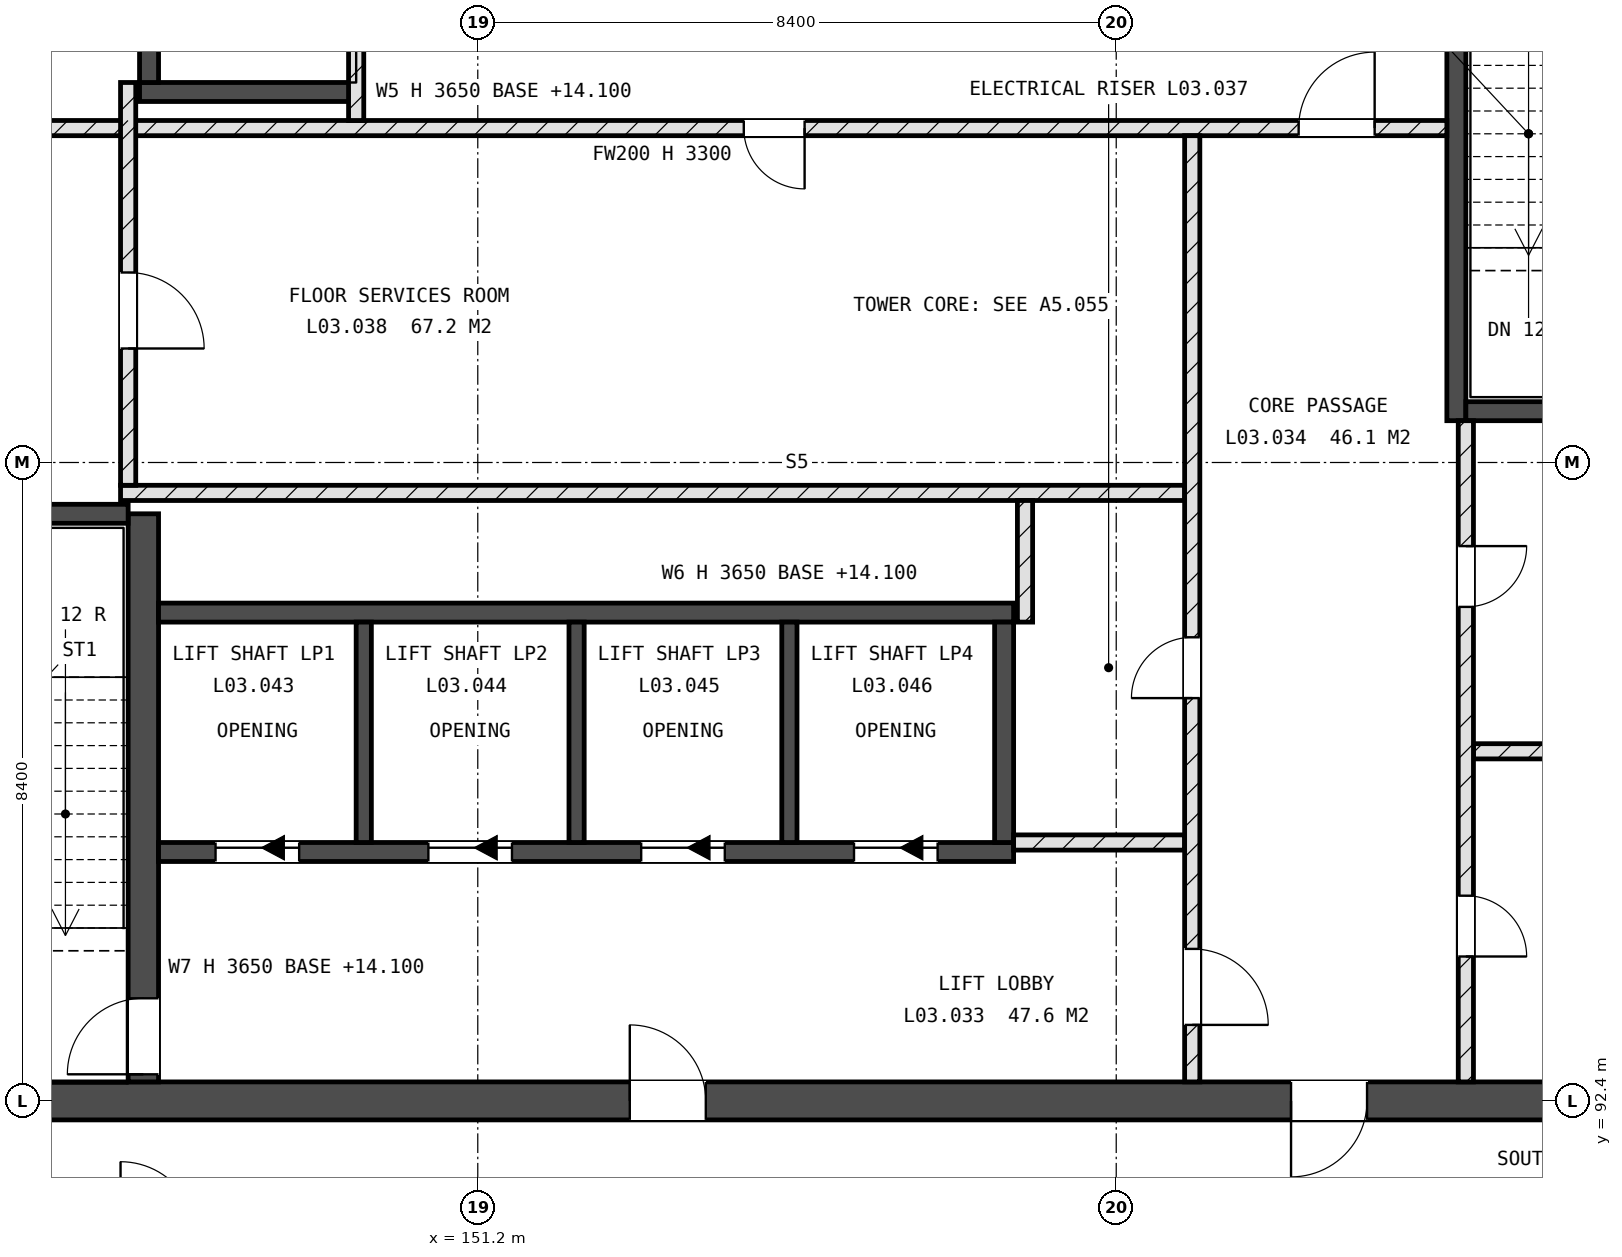
"""IFC4 building model, lengths in metres.
Left out: names, types, materials, properties, quantities, classifications, styles, units other than length and angle.
Written with IfcOpenShell. Run it as: python <this file> out.ifc"""

import sys

from ifc_helpers import new_model, si_unit, direction, frame, frame_2d, origin, place, context, subcontext, project, spatial, rectangle, extrude, element, fill, save


model = new_model("IFC4")
c1 = context("Model", 3, precision=1e-05, world=origin(), true_north=direction((0.0, 1.0)))
c2 = subcontext(c1, "Body", "Model", "MODEL_VIEW")
j1 = project(units=[si_unit("LENGTHUNIT", "METRE"), si_unit("PLANEANGLEUNIT", "RADIAN")], contexts=[c1])
p1 = place(None, origin())
s1 = spatial("IfcSite", under=j1, at=p1, CompositionType="ELEMENT")
p2 = place(p1, origin())
s2 = spatial("IfcBuilding", under=s1, at=p2, CompositionType="ELEMENT")
p3 = place(p2, frame((0.0, 0.0, 14.4)))
s3 = spatial("IfcBuildingStorey", under=s2, at=p3, CompositionType="ELEMENT", Elevation=14.4)
p4 = place(p3, frame((142.8, 92.4, -0.3), z_axis=(0.0, 0.0, 1.0), x_axis=(1.0, 0.0, 0.0)))
e1 = element("IfcWall", 1, at=p4, inside=s3, PredefinedType="SHEAR", context=c2, shape_type="SweptSolid", body=[
    extrude(rectangle(XDim=25.2, YDim=0.5, at=frame_2d((12.6, 0.0))), origin(), (0.0, 0.0, 1.0), 3.65),
])
p5 = place(p4, frame((1.4, 0.0, 0.3)))
e2 = element("IfcOpeningElement", 2, at=p5, cuts=e1, PredefinedType="OPENING", context=c2, shape_type="SweptSolid", body=[
    extrude(rectangle(XDim=1.0, YDim=2.1, at=frame_2d((0.5, 1.05))), frame((0.0, 0.26, 0.0), z_axis=(0.0, -1.0, 0.0), x_axis=(1.0, 0.0, 0.0)), (0.0, 0.0, 1.0), 0.52),
])
p6 = place(p4, frame((19.1, 0.0, 0.3)))
e3 = element("IfcOpeningElement", 3, at=p6, cuts=e1, PredefinedType="OPENING", context=c2, shape_type="SweptSolid", body=[
    extrude(rectangle(XDim=1.0, YDim=2.1, at=frame_2d((0.5, 1.05))), frame((0.0, 0.26, 0.0), z_axis=(0.0, -1.0, 0.0), x_axis=(1.0, 0.0, 0.0)), (0.0, 0.0, 1.0), 0.52),
])
p7 = place(p4, frame((10.4, 0.0, 0.3)))
e4 = element("IfcOpeningElement", 4, at=p7, cuts=e1, PredefinedType="OPENING", context=c2, shape_type="SweptSolid", body=[
    extrude(rectangle(XDim=1.0, YDim=2.1, at=frame_2d((0.5, 1.05))), frame((0.0, 0.26, 0.0), z_axis=(0.0, -1.0, 0.0), x_axis=(1.0, 0.0, 0.0)), (0.0, 0.0, 1.0), 0.52),
])
p8 = place(p3, frame((146.8, 92.65, -0.3), z_axis=(0.0, 0.0, 1.0), x_axis=(0.0, 1.0, 0.0)))
e5 = element("IfcWall", 5, at=p8, inside=s3, PredefinedType="SHEAR", context=c2, shape_type="SweptSolid", body=[
    extrude(rectangle(XDim=7.475, YDim=0.4, at=frame_2d((3.738, 0.0))), origin(), (0.0, 0.0, 1.0), 3.65),
])
p9 = place(p8, frame((0.1, 0.0, 0.3)))
e6 = element("IfcOpeningElement", 6, at=p9, cuts=e5, PredefinedType="OPENING", context=c2, shape_type="SweptSolid", body=[
    extrude(rectangle(XDim=1.0, YDim=2.1, at=frame_2d((0.5, 1.05))), frame((0.0, 0.21, 0.0), z_axis=(0.0, -1.0, 0.0), x_axis=(1.0, 0.0, 0.0)), (0.0, 0.0, 1.0), 0.42),
])
p10 = place(p3, frame((143.3, 100.125, -0.3), z_axis=(0.0, 0.0, 1.0), x_axis=(1.0, 0.0, 0.0)))
e7 = element("IfcWall", 7, at=p10, inside=s3, PredefinedType="SHEAR", context=c2, shape_type="SweptSolid", body=[
    extrude(rectangle(XDim=3.3, YDim=0.25, at=frame_2d((1.65, 0.0))), origin(), (0.0, 0.0, 1.0), 3.65),
])
p11 = place(p3, frame((164.075, 101.35, -0.3), z_axis=(0.0, 0.0, 1.0), x_axis=(0.0, 1.0, 0.0)))
e8 = element("IfcWall", 8, at=p11, inside=s3, PredefinedType="SHEAR", context=c2, shape_type="SweptSolid", body=[
    extrude(rectangle(XDim=7.6, YDim=0.25, at=frame_2d((3.8, 0.0))), origin(), (0.0, 0.0, 1.0), 3.65),
])
p12 = place(p11, frame((6.5, 0.0, 0.3)))
e9 = element("IfcOpeningElement", 9, at=p12, cuts=e8, PredefinedType="OPENING", context=c2, shape_type="SweptSolid", body=[
    extrude(rectangle(XDim=1.0, YDim=2.1, at=frame_2d((0.5, 1.05))), frame((0.0, 0.135, 0.0), z_axis=(0.0, -1.0, 0.0), x_axis=(1.0, 0.0, 0.0)), (0.0, 0.0, 1.0), 0.27),
])
p13 = place(p3, frame((164.2, 101.475, -0.3), z_axis=(0.0, 0.0, 1.0), x_axis=(1.0, 0.0, 0.0)))
e10 = element("IfcWall", 10, at=p13, inside=s3, PredefinedType="SHEAR", context=c2, shape_type="SweptSolid", body=[
    extrude(rectangle(XDim=3.55, YDim=0.25, at=frame_2d((1.775, 0.0))), origin(), (0.0, 0.0, 1.0), 3.65),
])
p14 = place(p3, frame((147.0, 95.675, -0.3), z_axis=(0.0, 0.0, 1.0), x_axis=(1.0, 0.0, 0.0)))
e11 = element("IfcWall", 11, at=p14, inside=s3, PredefinedType="SHEAR", context=c2, shape_type="SweptSolid", body=[
    extrude(rectangle(XDim=11.25, YDim=0.25, at=frame_2d((5.625, 0.0))), origin(), (0.0, 0.0, 1.0), 3.65),
])
p15 = place(p14, frame((0.75, 0.0, 0.3)))
e12 = element("IfcOpeningElement", 12, at=p15, cuts=e11, PredefinedType="OPENING", context=c2, shape_type="SweptSolid", body=[
    extrude(rectangle(XDim=1.1, YDim=2.1, at=frame_2d((0.55, 1.05))), frame((0.0, 0.135, 0.0), z_axis=(0.0, -1.0, 0.0), x_axis=(1.0, 0.0, 0.0)), (0.0, 0.0, 1.0), 0.27),
])
p16 = place(p14, frame((3.55, 0.0, 0.3)))
e13 = element("IfcOpeningElement", 13, at=p16, cuts=e11, PredefinedType="OPENING", context=c2, shape_type="SweptSolid", body=[
    extrude(rectangle(XDim=1.1, YDim=2.1, at=frame_2d((0.55, 1.05))), frame((0.0, 0.135, 0.0), z_axis=(0.0, -1.0, 0.0), x_axis=(1.0, 0.0, 0.0)), (0.0, 0.0, 1.0), 0.27),
])
p17 = place(p14, frame((6.35, 0.0, 0.3)))
e14 = element("IfcOpeningElement", 14, at=p17, cuts=e11, PredefinedType="OPENING", context=c2, shape_type="SweptSolid", body=[
    extrude(rectangle(XDim=1.1, YDim=2.1, at=frame_2d((0.55, 1.05))), frame((0.0, 0.135, 0.0), z_axis=(0.0, -1.0, 0.0), x_axis=(1.0, 0.0, 0.0)), (0.0, 0.0, 1.0), 0.27),
])
p18 = place(p14, frame((9.15, 0.0, 0.3)))
e15 = element("IfcOpeningElement", 15, at=p18, cuts=e11, PredefinedType="OPENING", context=c2, shape_type="SweptSolid", body=[
    extrude(rectangle(XDim=1.1, YDim=2.1, at=frame_2d((0.55, 1.05))), frame((0.0, 0.135, 0.0), z_axis=(0.0, -1.0, 0.0), x_axis=(1.0, 0.0, 0.0)), (0.0, 0.0, 1.0), 0.27),
])
p19 = place(p3, frame((147.0, 98.825, -0.3), z_axis=(0.0, 0.0, 1.0), x_axis=(1.0, 0.0, 0.0)))
e16 = element("IfcWall", 16, at=p19, inside=s3, PredefinedType="SHEAR", context=c2, shape_type="SweptSolid", body=[
    extrude(rectangle(XDim=11.25, YDim=0.25, at=frame_2d((5.625, 0.0))), origin(), (0.0, 0.0, 1.0), 3.65),
])
p20 = place(p3, frame((158.125, 95.8, -0.3), z_axis=(0.0, 0.0, 1.0), x_axis=(0.0, 1.0, 0.0)))
e17 = element("IfcWall", 17, at=p20, inside=s3, PredefinedType="SHEAR", context=c2, shape_type="SweptSolid", body=[
    extrude(rectangle(XDim=2.9, YDim=0.25, at=frame_2d((1.45, 0.0))), origin(), (0.0, 0.0, 1.0), 3.65),
])
for number, where, z_axis, x_axis in (
    (18, (149.7, 95.8, -0.3), (0.0, 0.0, 1.0), (0.0, 1.0, 0.0)),
    (19, (152.5, 95.8, -0.3), (0.0, 0.0, 1.0), (0.0, 1.0, 0.0)),
    (20, (155.3, 95.8, -0.3), (0.0, 0.0, 1.0), (0.0, 1.0, 0.0)),
):
    element("IfcWall", number, at=place(p3, frame(where, z_axis=z_axis, x_axis=x_axis)), inside=s3, PredefinedType="SHEAR", context=c2, shape_type="SweptSolid", body=[
        extrude(rectangle(XDim=2.9, YDim=0.2, at=frame_2d((1.45, 0.0))), origin(), (0.0, 0.0, 1.0), 3.65),
    ])
p21 = place(p3, frame((146.75, 105.675, -0.3), z_axis=(0.0, 0.0, 1.0), x_axis=(1.0, 0.0, 0.0)))
e21 = element("IfcWall", 21, at=p21, inside=s3, PredefinedType="SHEAR", context=c2, shape_type="SweptSolid", body=[
    extrude(rectangle(XDim=2.85, YDim=0.25, at=frame_2d((1.425, 0.0))), origin(), (0.0, 0.0, 1.0), 3.65),
])
p22 = place(p3, frame((146.875, 105.8, -0.3), z_axis=(0.0, 0.0, 1.0), x_axis=(0.0, 1.0, 0.0)))
e22 = element("IfcWall", 22, at=p22, inside=s3, PredefinedType="SHEAR", context=c2, shape_type="SweptSolid", body=[
    extrude(rectangle(XDim=2.9, YDim=0.25, at=frame_2d((1.45, 0.0))), origin(), (0.0, 0.0, 1.0), 3.65),
])
p23 = place(p3, frame((158.25, 95.8, 0.0), z_axis=(0.0, 0.0, 1.0), x_axis=(1.0, 0.0, 0.0)))
e23 = element("IfcWall", 23, at=p23, inside=s3, PredefinedType="SOLIDWALL", context=c2, shape_type="SweptSolid", body=[
    extrude(rectangle(XDim=2.25, YDim=0.2, at=frame_2d((1.125, 0.0))), origin(), (0.0, 0.0, 1.0), 3.3),
])
p24 = place(p3, frame((164.3, 97.0, 0.0), z_axis=(0.0, 0.0, 1.0), x_axis=(1.0, 0.0, 0.0)))
e24 = element("IfcWall", 24, at=p24, inside=s3, PredefinedType="SOLIDWALL", context=c2, shape_type="SweptSolid", body=[
    extrude(rectangle(XDim=3.2, YDim=0.2, at=frame_2d((1.6, 0.0))), origin(), (0.0, 0.0, 1.0), 3.3),
])
p25 = place(p3, frame((146.5, 100.4, 0.0), z_axis=(0.0, 0.0, 1.0), x_axis=(1.0, 0.0, 0.0)))
e25 = element("IfcWall", 25, at=p25, inside=s3, PredefinedType="SOLIDWALL", context=c2, shape_type="SweptSolid", body=[
    extrude(rectangle(XDim=14.0, YDim=0.2, at=frame_2d((7.0, 0.0))), origin(), (0.0, 0.0, 1.0), 3.3),
])
p26 = place(p3, frame((143.3, 105.2, 0.0), z_axis=(0.0, 0.0, 1.0), x_axis=(1.0, 0.0, 0.0)))
e26 = element("IfcWall", 26, at=p26, inside=s3, PredefinedType="SOLIDWALL", context=c2, shape_type="SweptSolid", body=[
    extrude(rectangle(XDim=20.65, YDim=0.2, at=frame_2d((10.325, 0.0))), origin(), (0.0, 0.0, 1.0), 3.3),
])
p27 = place(p26, frame((11.4, 0.0, 0.0)))
e27 = element("IfcOpeningElement", 27, at=p27, cuts=e26, PredefinedType="OPENING", context=c2, shape_type="SweptSolid", body=[
    extrude(rectangle(XDim=0.8, YDim=2.1, at=frame_2d((0.4, 1.05))), frame((0.0, 0.11, 0.0), z_axis=(0.0, -1.0, 0.0), x_axis=(1.0, 0.0, 0.0)), (0.0, 0.0, 1.0), 0.22),
])
p28 = place(p26, frame((18.7, 0.0, 0.0)))
e28 = element("IfcOpeningElement", 28, at=p28, cuts=e26, PredefinedType="OPENING", context=c2, shape_type="SweptSolid", body=[
    extrude(rectangle(XDim=1.0, YDim=2.1, at=frame_2d((0.5, 1.05))), frame((0.0, 0.11, 0.0), z_axis=(0.0, -1.0, 0.0), x_axis=(1.0, 0.0, 0.0)), (0.0, 0.0, 1.0), 0.22),
])
p29 = place(p3, frame((146.6, 100.5, 0.0), z_axis=(0.0, 0.0, 1.0), x_axis=(0.0, 1.0, 0.0)))
e29 = element("IfcWall", 29, at=p29, inside=s3, PredefinedType="SOLIDWALL", context=c2, shape_type="SweptSolid", body=[
    extrude(rectangle(XDim=5.3, YDim=0.2, at=frame_2d((2.65, 0.0))), origin(), (0.0, 0.0, 1.0), 3.3),
])
p30 = place(p29, frame((1.8, 0.0, 0.0)))
e30 = element("IfcOpeningElement", 30, at=p30, cuts=e29, PredefinedType="OPENING", context=c2, shape_type="SweptSolid", body=[
    extrude(rectangle(XDim=1.0, YDim=2.1, at=frame_2d((0.5, 1.05))), frame((0.0, 0.11, 0.0), z_axis=(0.0, -1.0, 0.0), x_axis=(1.0, 0.0, 0.0)), (0.0, 0.0, 1.0), 0.22),
])
p31 = place(p3, frame((149.6, 105.3, 0.0), z_axis=(0.0, 0.0, 1.0), x_axis=(0.0, 1.0, 0.0)))
e31 = element("IfcWall", 31, at=p31, inside=s3, PredefinedType="SOLIDWALL", context=c2, shape_type="SweptSolid", body=[
    extrude(rectangle(XDim=3.65, YDim=0.2, at=frame_2d((1.825, 0.0))), origin(), (0.0, 0.0, 1.0), 3.3),
])
p32 = place(p31, frame((1.4, 0.0, 0.0)))
e32 = element("IfcOpeningElement", 32, at=p32, cuts=e31, PredefinedType="OPENING", context=c2, shape_type="SweptSolid", body=[
    extrude(rectangle(XDim=1.1, YDim=2.1, at=frame_2d((0.55, 1.05))), frame((0.0, 0.11, 0.0), z_axis=(0.0, -1.0, 0.0), x_axis=(1.0, 0.0, 0.0)), (0.0, 0.0, 1.0), 0.22),
])
p33 = place(p3, frame((158.4, 98.7, 0.0), z_axis=(0.0, 0.0, 1.0), x_axis=(0.0, 1.0, 0.0)))
e33 = element("IfcWall", 33, at=p33, inside=s3, PredefinedType="SOLIDWALL", context=c2, shape_type="SweptSolid", body=[
    extrude(rectangle(XDim=1.6, YDim=0.2, at=frame_2d((0.8, 0.0))), origin(), (0.0, 0.0, 1.0), 3.3),
])
p34 = place(p3, frame((160.6, 92.65, 0.0), z_axis=(0.0, 0.0, 1.0), x_axis=(0.0, 1.0, 0.0)))
e34 = element("IfcWall", 34, at=p34, inside=s3, PredefinedType="SOLIDWALL", context=c2, shape_type="SweptSolid", body=[
    extrude(rectangle(XDim=12.45, YDim=0.2, at=frame_2d((6.225, 0.0))), origin(), (0.0, 0.0, 1.0), 3.3),
])
p35 = place(p34, frame((5.05, 0.0, 0.0)))
e35 = element("IfcOpeningElement", 35, at=p35, cuts=e34, PredefinedType="OPENING", context=c2, shape_type="SweptSolid", body=[
    extrude(rectangle(XDim=0.8, YDim=2.1, at=frame_2d((0.4, 1.05))), frame((0.0, 0.11, 0.0), z_axis=(0.0, -1.0, 0.0), x_axis=(1.0, 0.0, 0.0)), (0.0, 0.0, 1.0), 0.22),
])
p36 = place(p34, frame((0.75, 0.0, 0.0)))
e36 = element("IfcOpeningElement", 36, at=p36, cuts=e34, PredefinedType="OPENING", context=c2, shape_type="SweptSolid", body=[
    extrude(rectangle(XDim=1.0, YDim=2.1, at=frame_2d((0.5, 1.05))), frame((0.0, 0.11, 0.0), z_axis=(0.0, -1.0, 0.0), x_axis=(1.0, 0.0, 0.0)), (0.0, 0.0, 1.0), 0.22),
])
p37 = place(p3, frame((164.2, 92.65, 0.0), z_axis=(0.0, 0.0, 1.0), x_axis=(0.0, 1.0, 0.0)))
e37 = element("IfcWall", 37, at=p37, inside=s3, PredefinedType="SOLIDWALL", context=c2, shape_type="SweptSolid", body=[
    extrude(rectangle(XDim=8.7, YDim=0.2, at=frame_2d((4.35, 0.0))), origin(), (0.0, 0.0, 1.0), 3.3),
])
p38 = place(p37, frame((1.65, 0.0, 0.0)))
e38 = element("IfcOpeningElement", 38, at=p38, cuts=e37, PredefinedType="OPENING", context=c2, shape_type="SweptSolid", body=[
    extrude(rectangle(XDim=0.8, YDim=2.1, at=frame_2d((0.4, 1.05))), frame((0.0, 0.11, 0.0), z_axis=(0.0, -1.0, 0.0), x_axis=(1.0, 0.0, 0.0)), (0.0, 0.0, 1.0), 0.22),
])
p39 = place(p37, frame((6.25, 0.0, 0.0)))
e39 = element("IfcOpeningElement", 39, at=p39, cuts=e37, PredefinedType="OPENING", context=c2, shape_type="SweptSolid", body=[
    extrude(rectangle(XDim=0.8, YDim=2.1, at=frame_2d((0.4, 1.05))), frame((0.0, 0.11, 0.0), z_axis=(0.0, -1.0, 0.0), x_axis=(1.0, 0.0, 0.0)), (0.0, 0.0, 1.0), 0.22),
])
p40 = place(p15, origin())
e40 = element("IfcDoor", 40, at=p40, inside=s3, OperationType="SLIDING_TO_LEFT", PredefinedType="DOOR", context=c2, shape_type="SweptSolid", body=[
    extrude(rectangle(XDim=1.1, YDim=2.1, at=frame_2d((0.55, 1.05))), frame((0.0, 0.025, 0.0), z_axis=(0.0, -1.0, 0.0), x_axis=(1.0, 0.0, 0.0)), (0.0, 0.0, 1.0), 0.05),
])
fill(e12, e40)
p41 = place(p16, origin())
e41 = element("IfcDoor", 41, at=p41, inside=s3, OperationType="SLIDING_TO_LEFT", PredefinedType="DOOR", context=c2, shape_type="SweptSolid", body=[
    extrude(rectangle(XDim=1.1, YDim=2.1, at=frame_2d((0.55, 1.05))), frame((0.0, 0.025, 0.0), z_axis=(0.0, -1.0, 0.0), x_axis=(1.0, 0.0, 0.0)), (0.0, 0.0, 1.0), 0.05),
])
fill(e13, e41)
p42 = place(p17, origin())
e42 = element("IfcDoor", 42, at=p42, inside=s3, OperationType="SLIDING_TO_LEFT", PredefinedType="DOOR", context=c2, shape_type="SweptSolid", body=[
    extrude(rectangle(XDim=1.1, YDim=2.1, at=frame_2d((0.55, 1.05))), frame((0.0, 0.025, 0.0), z_axis=(0.0, -1.0, 0.0), x_axis=(1.0, 0.0, 0.0)), (0.0, 0.0, 1.0), 0.05),
])
fill(e14, e42)
p43 = place(p18, origin())
e43 = element("IfcDoor", 43, at=p43, inside=s3, OperationType="SLIDING_TO_LEFT", PredefinedType="DOOR", context=c2, shape_type="SweptSolid", body=[
    extrude(rectangle(XDim=1.1, YDim=2.1, at=frame_2d((0.55, 1.05))), frame((0.0, 0.025, 0.0), z_axis=(0.0, -1.0, 0.0), x_axis=(1.0, 0.0, 0.0)), (0.0, 0.0, 1.0), 0.05),
])
fill(e15, e43)
p44 = place(p9, origin())
e44 = element("IfcDoor", 44, at=p44, inside=s3, OperationType="SINGLE_SWING_RIGHT", PredefinedType="DOOR", context=c2, shape_type="SweptSolid", body=[
    extrude(rectangle(XDim=1.0, YDim=2.1, at=frame_2d((0.5, 1.05))), frame((0.0, 0.025, 0.0), z_axis=(0.0, -1.0, 0.0), x_axis=(1.0, 0.0, 0.0)), (0.0, 0.0, 1.0), 0.05),
])
fill(e6, e44)
p45 = place(p38, origin())
e45 = element("IfcDoor", 45, at=p45, inside=s3, OperationType="SINGLE_SWING_LEFT", PredefinedType="DOOR", context=c2, shape_type="SweptSolid", body=[
    extrude(rectangle(XDim=0.8, YDim=2.1, at=frame_2d((0.4, 1.05))), frame((0.0, 0.025, 0.0), z_axis=(0.0, -1.0, 0.0), x_axis=(1.0, 0.0, 0.0)), (0.0, 0.0, 1.0), 0.05),
])
fill(e38, e45)
p46 = place(p39, origin())
e46 = element("IfcDoor", 46, at=p46, inside=s3, OperationType="SINGLE_SWING_RIGHT", PredefinedType="DOOR", context=c2, shape_type="SweptSolid", body=[
    extrude(rectangle(XDim=0.8, YDim=2.1, at=frame_2d((0.4, 1.05))), frame((0.0, 0.025, 0.0), z_axis=(0.0, -1.0, 0.0), x_axis=(1.0, 0.0, 0.0)), (0.0, 0.0, 1.0), 0.05),
])
fill(e39, e46)
p47 = place(p35, origin())
e47 = element("IfcDoor", 47, at=p47, inside=s3, OperationType="SINGLE_SWING_RIGHT", PredefinedType="DOOR", context=c2, shape_type="SweptSolid", body=[
    extrude(rectangle(XDim=0.8, YDim=2.1, at=frame_2d((0.4, 1.05))), frame((0.0, 0.025, 0.0), z_axis=(0.0, -1.0, 0.0), x_axis=(1.0, 0.0, 0.0)), (0.0, 0.0, 1.0), 0.05),
])
fill(e35, e47)
p48 = place(p27, origin())
e48 = element("IfcDoor", 48, at=p48, inside=s3, OperationType="SINGLE_SWING_RIGHT", PredefinedType="DOOR", context=c2, shape_type="SweptSolid", body=[
    extrude(rectangle(XDim=0.8, YDim=2.1, at=frame_2d((0.4, 1.05))), frame((0.0, 0.025, 0.0), z_axis=(0.0, -1.0, 0.0), x_axis=(1.0, 0.0, 0.0)), (0.0, 0.0, 1.0), 0.05),
])
fill(e27, e48)
p49 = place(p30, origin())
e49 = element("IfcDoor", 49, at=p49, inside=s3, OperationType="SINGLE_SWING_LEFT", PredefinedType="DOOR", context=c2, shape_type="SweptSolid", body=[
    extrude(rectangle(XDim=1.0, YDim=2.1, at=frame_2d((0.5, 1.05))), frame((0.0, 0.025, 0.0), z_axis=(0.0, -1.0, 0.0), x_axis=(1.0, 0.0, 0.0)), (0.0, 0.0, 1.0), 0.05),
])
fill(e30, e49)
p50 = place(p6, origin())
e50 = element("IfcDoor", 50, at=p50, inside=s3, OperationType="SINGLE_SWING_LEFT", PredefinedType="DOOR", context=c2, shape_type="SweptSolid", body=[
    extrude(rectangle(XDim=1.0, YDim=2.1, at=frame_2d((0.5, 1.05))), frame((0.0, 0.025, 0.0), z_axis=(0.0, -1.0, 0.0), x_axis=(1.0, 0.0, 0.0)), (0.0, 0.0, 1.0), 0.05),
])
fill(e3, e50)
p51 = place(p7, origin())
e51 = element("IfcDoor", 51, at=p51, inside=s3, OperationType="SINGLE_SWING_RIGHT", PredefinedType="DOOR", context=c2, shape_type="SweptSolid", body=[
    extrude(rectangle(XDim=1.0, YDim=2.1, at=frame_2d((0.5, 1.05))), frame((0.0, 0.025, 0.0), z_axis=(0.0, -1.0, 0.0), x_axis=(1.0, 0.0, 0.0)), (0.0, 0.0, 1.0), 0.05),
])
fill(e4, e51)
p52 = place(p36, origin())
e52 = element("IfcDoor", 52, at=p52, inside=s3, OperationType="SINGLE_SWING_LEFT", PredefinedType="DOOR", context=c2, shape_type="SweptSolid", body=[
    extrude(rectangle(XDim=1.0, YDim=2.1, at=frame_2d((0.5, 1.05))), frame((0.0, 0.025, 0.0), z_axis=(0.0, -1.0, 0.0), x_axis=(1.0, 0.0, 0.0)), (0.0, 0.0, 1.0), 0.05),
])
fill(e36, e52)
p53 = place(p28, origin())
e53 = element("IfcDoor", 53, at=p53, inside=s3, OperationType="SINGLE_SWING_LEFT", PredefinedType="DOOR", context=c2, shape_type="SweptSolid", body=[
    extrude(rectangle(XDim=1.0, YDim=2.1, at=frame_2d((0.5, 1.05))), frame((0.0, 0.025, 0.0), z_axis=(0.0, -1.0, 0.0), x_axis=(1.0, 0.0, 0.0)), (0.0, 0.0, 1.0), 0.05),
])
fill(e28, e53)
save(model, sys.argv[1])
